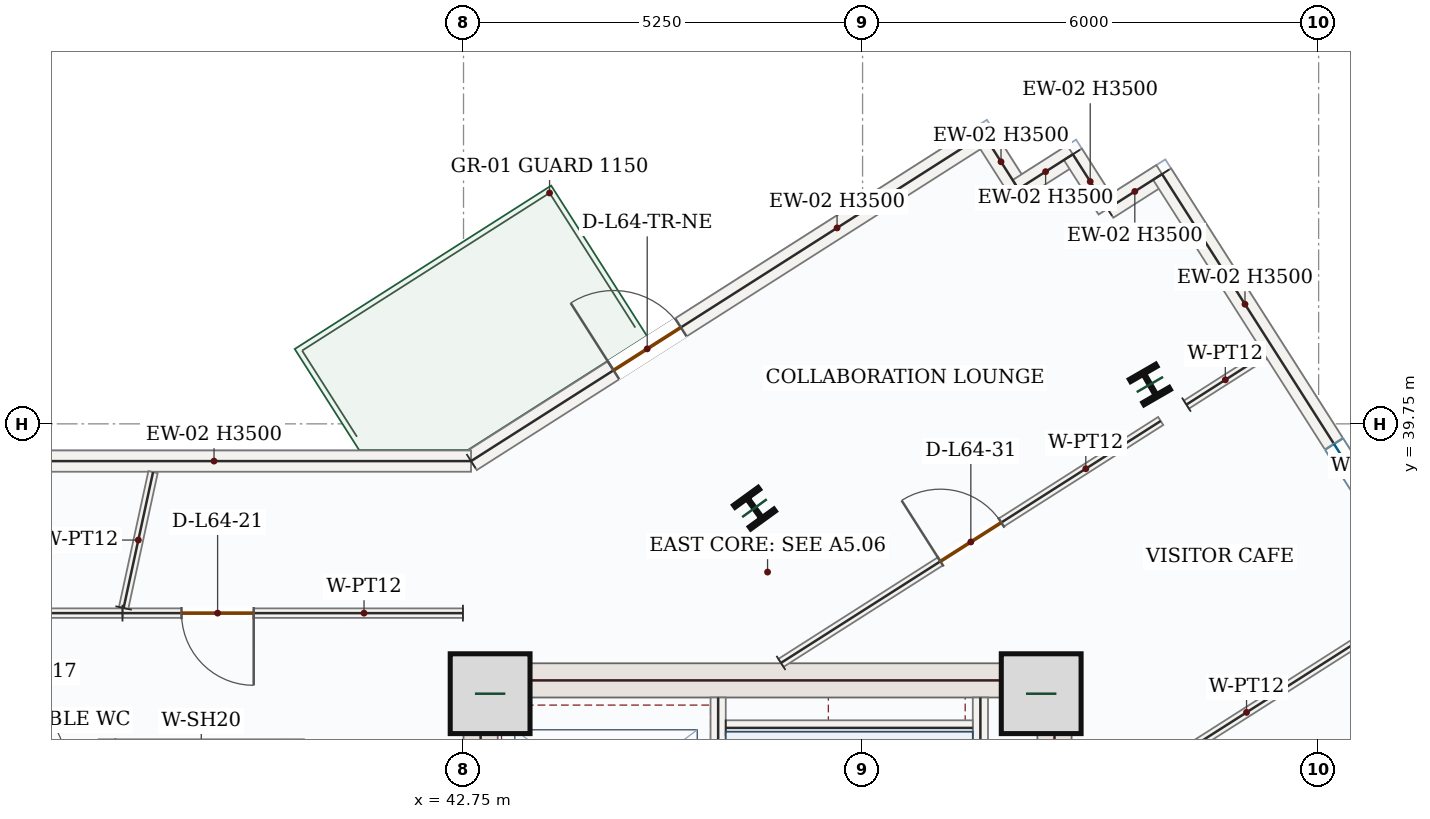
"""IFC4 building model, lengths in metres.
Left out: names, types, materials, properties, quantities, classifications, styles, units other than length and angle.
Written with IfcOpenShell. Run it as: python <this file> out.ifc"""

import sys

from ifc_helpers import new_model, si_unit, direction, frame, frame_2d, origin, origin_2d, place, context, subcontext, project, spatial, rectangle, i_section, extrude, source, transform, mapped, element, fill, save


model = new_model("IFC4")
c1 = context("Model", 3, precision=1e-05, world=origin(), true_north=direction((0.0, 1.0)))
c2 = subcontext(c1, "Body", "Model", "MODEL_VIEW")
j1 = project(units=[si_unit("LENGTHUNIT", "METRE"), si_unit("PLANEANGLEUNIT", "RADIAN")], contexts=[c1])
p1 = place(None, origin())
s1 = spatial("IfcSite", under=j1, at=p1, CompositionType="ELEMENT")
p2 = place(p1, origin())
s2 = spatial("IfcBuilding", under=s1, at=p2, CompositionType="ELEMENT")
p3 = place(p2, frame((0.0, 0.0, 269.1)))
s3 = spatial("IfcBuildingStorey", under=s2, at=p3, CompositionType="ELEMENT", Elevation=269.1)
p4 = place(p3, frame((42.975, 28.05, 0.0), z_axis=(0.0, 0.0, 1.0), x_axis=(0.0, 1.0, 0.0)))
e1 = element("IfcWall", 1, at=p4, inside=s3, PredefinedType="SHEAR", context=c2, shape_type="SweptSolid", body=[
    extrude(rectangle(XDim=8.55, YDim=0.45, at=frame_2d((4.275, 0.0))), origin(), (0.0, 0.0, 1.0), 3.5),
])
p5 = place(p4, frame((1.5, 0.0, 0.0)))
e2 = element("IfcOpeningElement", 2, at=p5, cuts=e1, PredefinedType="OPENING", context=c2, shape_type="SweptSolid", body=[
    extrude(rectangle(XDim=1.1, YDim=2.2, at=frame_2d((0.55, 1.1))), frame((0.0, 0.235, 0.0), z_axis=(0.0, -1.0, 0.0), x_axis=(1.0, 0.0, 0.0)), (0.0, 0.0, 1.0), 0.47),
])
m1 = source(origin(), c2, "Body", "SweptSolid", [
    extrude(rectangle(XDim=8.55, YDim=0.45, at=frame_2d((4.275, 0.0))), origin(), (0.0, 0.0, 1.0), 3.5),
])
p6 = place(p3, frame((50.525, 28.05, 0.0), z_axis=(0.0, 0.0, 1.0), x_axis=(0.0, 1.0, 0.0)))
e3 = element("IfcWall", 3, at=p6, inside=s3, PredefinedType="SHEAR", context=c2, shape_type="MappedRepresentation", body=[
    mapped(m1, transform((0.0, 0.0, 0.0), x_axis=(1.0, 0.0, 0.0), y_axis=(0.0, 1.0, 0.0), z_axis=(0.0, 0.0, 1.0), scale=1.0)),
])
m2 = source(origin(), c2, "Body", "SweptSolid", [
    extrude(rectangle(XDim=7.1, YDim=0.45, at=frame_2d((3.55, 0.0))), origin(), (0.0, 0.0, 1.0), 3.5),
])
p7 = place(p3, frame((43.2, 36.375, 0.0), z_axis=(0.0, 0.0, 1.0), x_axis=(1.0, 0.0, 0.0)))
e4 = element("IfcWall", 4, at=p7, inside=s3, PredefinedType="SHEAR", context=c2, shape_type="MappedRepresentation", body=[
    mapped(m2, transform((0.0, 0.0, 0.0), x_axis=(1.0, 0.0, 0.0), y_axis=(0.0, 1.0, 0.0), z_axis=(0.0, 0.0, 1.0), scale=1.0)),
])
m3 = source(origin(), c2, "Body", "SweptSolid", [
    extrude(rectangle(XDim=1.05, YDim=1.05, at=origin_2d()), origin(), (0.0, 0.0, 1.0), 3.75),
])
for number, where, z_axis, x_axis in (
    (5, (43.1, 36.2, 0.0), (0.0, 0.0, 1.0), (1.0, 0.0, 0.0)),
    (6, (50.35, 36.2, 0.0), (0.0, 0.0, 1.0), (1.0, 0.0, 0.0)),
):
    element("IfcColumn", number, at=place(p3, frame(where, z_axis=z_axis, x_axis=x_axis)), inside=s3, PredefinedType="COLUMN", context=c2, shape_type="MappedRepresentation", body=[
        mapped(m3, transform((0.0, 0.0, 0.0), x_axis=(1.0, 0.0, 0.0), y_axis=(0.0, 1.0, 0.0), z_axis=(0.0, 0.0, 1.0), scale=1.0)),
    ])
m4 = source(origin(), c2, "Body", "SweptSolid", [
    extrude(i_section(OverallWidth=0.399, OverallDepth=0.386, WebThickness=0.021, FlangeThickness=0.033, FilletRadius=0.018, at=origin_2d()), origin(), (0.0, 0.0, 1.0), 3.75),
])
for number, where, z_axis, x_axis in (
    (7, (46.578, 38.641, 0.0), (0.0, 0.0, 1.0), (0.809, 0.588, 0.0)),
    (8, (51.78, 40.268, 0.0), (0.0, 0.0, 1.0), (0.866, 0.5, 0.0)),
):
    element("IfcColumn", number, at=place(p3, frame(where, z_axis=z_axis, x_axis=x_axis)), inside=s3, PredefinedType="COLUMN", context=c2, shape_type="MappedRepresentation", body=[
        mapped(m4, transform((0.0, 0.0, 0.0), x_axis=(1.0, 0.0, 0.0), y_axis=(0.0, 1.0, 0.0), z_axis=(0.0, 0.0, 1.0), scale=1.0)),
    ])
p8 = place(p3, frame((42.849, 39.26, 0.0), z_axis=(0.0, 0.0, 1.0), x_axis=(0.843388565396, 0.537304129669, 0.0)))
e9 = element("IfcWall", 9, at=p8, inside=s3, PredefinedType="SOLIDWALL", context=c2, shape_type="SweptSolid", body=[
    extrude(rectangle(XDim=7.996, YDim=0.28, at=frame_2d((3.998, 0.0))), origin(), (0.0, 0.0, 1.0), 3.5),
])
p9 = place(p8, frame((2.223, 0.0, 0.0)))
e10 = element("IfcOpeningElement", 10, at=p9, cuts=e9, PredefinedType="OPENING", context=c2, shape_type="SweptSolid", body=[
    extrude(rectangle(XDim=1.05, YDim=2.15, at=frame_2d((0.525, 1.075))), frame((0.0, 0.15, 0.0), z_axis=(0.0, -1.0, 0.0), x_axis=(1.0, 0.0, 0.0)), (0.0, 0.0, 1.0), 0.3),
])
m5 = source(origin(), c2, "Body", "SweptSolid", [
    extrude(rectangle(XDim=0.85, YDim=0.28, at=frame_2d((0.425, 0.0))), origin(), (0.0, 0.0, 1.0), 3.5),
])
for number, where, z_axis, x_axis in (
    (11, (49.593, 43.556, 0.0), (0.0, 0.0, 1.0), (0.537, -0.843, 0.0)),
    (12, (50.05, 42.84, 0.0), (0.0, 0.0, 1.0), (0.843, 0.537, 0.0)),
    (13, (50.767, 43.296, 0.0), (0.0, 0.0, 1.0), (0.537, -0.843, 0.0)),
    (14, (51.223, 42.579, 0.0), (0.0, 0.0, 1.0), (0.843, 0.537, 0.0)),
):
    element("IfcWall", number, at=place(p3, frame(where, z_axis=z_axis, x_axis=x_axis)), inside=s3, PredefinedType="SOLIDWALL", context=c2, shape_type="MappedRepresentation", body=[
        mapped(m5, transform((0.0, 0.0, 0.0), x_axis=(1.0, 0.0, 0.0), y_axis=(0.0, 1.0, 0.0), z_axis=(0.0, 0.0, 1.0), scale=1.0)),
    ])
p10 = place(p3, frame((51.94, 43.036, 0.0), z_axis=(0.0, 0.0, 1.0), x_axis=(0.537314949054, -0.843381672508, 0.0)))
e15 = element("IfcWall", 15, at=p10, inside=s3, PredefinedType="SOLIDWALL", context=c2, shape_type="SweptSolid", body=[
    extrude(rectangle(XDim=9.92, YDim=0.28, at=frame_2d((4.96, 0.0))), origin(), (0.0, 0.0, 1.0), 3.5),
])
p11 = place(p10, frame((4.21, 0.0, 0.85)))
e16 = element("IfcOpeningElement", 16, at=p11, cuts=e15, PredefinedType="OPENING", context=c2, shape_type="SweptSolid", body=[
    extrude(rectangle(XDim=1.5, YDim=1.5, at=frame_2d((0.75, 0.75))), frame((0.0, 0.15, 0.0), z_axis=(0.0, -1.0, 0.0), x_axis=(1.0, 0.0, 0.0)), (0.0, 0.0, 1.0), 0.3),
])
m6 = source(origin(), c2, "Body", "SweptSolid", [
    extrude(rectangle(XDim=6.763, YDim=0.28, at=frame_2d((3.381, 0.0))), origin(), (0.0, 0.0, 1.0), 3.5),
])
p12 = place(p3, frame((36.086, 39.26, 0.0), z_axis=(0.0, 0.0, 1.0), x_axis=(1.0, 0.0, 0.0)))
e17 = element("IfcWall", 17, at=p12, inside=s3, PredefinedType="SOLIDWALL", context=c2, shape_type="MappedRepresentation", body=[
    mapped(m6, transform((0.0, 0.0, 0.0), x_axis=(1.0, 0.0, 0.0), y_axis=(0.0, 1.0, 0.0), z_axis=(0.0, 0.0, 1.0), scale=1.0)),
])
m7 = source(origin(), c2, "Body", "SweptSolid", [
    extrude(rectangle(XDim=7.87, YDim=0.2, at=frame_2d((3.935, 0.0))), origin(), (0.0, 0.0, 1.0), 3.5),
])
p13 = place(p3, frame((49.55, 28.28, 0.0), z_axis=(0.0, 0.0, 1.0), x_axis=(0.0, 1.0, 0.0)))
e18 = element("IfcWall", 18, at=p13, inside=s3, PredefinedType="SOLIDWALL", context=c2, shape_type="MappedRepresentation", body=[
    mapped(m7, transform((0.0, 0.0, 0.0), x_axis=(1.0, 0.0, 0.0), y_axis=(0.0, 1.0, 0.0), z_axis=(0.0, 0.0, 1.0), scale=1.0)),
])
p14 = place(p3, frame((46.1, 28.15, 0.0), z_axis=(0.0, 0.0, 1.0), x_axis=(0.0, 1.0, 0.0)))
e19 = element("IfcWall", 19, at=p14, inside=s3, PredefinedType="SOLIDWALL", context=c2, shape_type="SweptSolid", body=[
    extrude(rectangle(XDim=8.0, YDim=0.2, at=frame_2d((4.0, 0.0))), origin(), (0.0, 0.0, 1.0), 3.5),
])
p15 = place(p14, frame((0.4, 0.0, 0.0)))
e20 = element("IfcOpeningElement", 20, at=p15, cuts=e19, PredefinedType="OPENING", context=c2, shape_type="SweptSolid", body=[
    extrude(rectangle(XDim=1.05, YDim=2.15, at=frame_2d((0.525, 1.075))), frame((0.0, 0.11, 0.0), z_axis=(0.0, -1.0, 0.0), x_axis=(1.0, 0.0, 0.0)), (0.0, 0.0, 1.0), 0.22),
])
m8 = source(origin(), c2, "Body", "SweptSolid", [
    extrude(rectangle(XDim=3.25, YDim=0.2, at=frame_2d((1.625, 0.0))), origin(), (0.0, 0.0, 1.0), 3.5),
])
p16 = place(p3, frame((46.2, 35.75, 0.0), z_axis=(0.0, 0.0, 1.0), x_axis=(1.0, 0.0, 0.0)))
e21 = element("IfcWall", 21, at=p16, inside=s3, PredefinedType="SOLIDWALL", context=c2, shape_type="MappedRepresentation", body=[
    mapped(m8, transform((0.0, 0.0, 0.0), x_axis=(1.0, 0.0, 0.0), y_axis=(0.0, 1.0, 0.0), z_axis=(0.0, 0.0, 1.0), scale=1.0)),
])
m9 = source(origin(), c2, "Body", "SweptSolid", [
    extrude(rectangle(XDim=2.4, YDim=0.2, at=frame_2d((1.2, 0.0))), origin(), (0.0, 0.0, 1.0), 3.5),
])
p17 = place(p3, frame((38.05, 33.2, 0.0), z_axis=(0.0, 0.0, 1.0), x_axis=(0.0, 1.0, 0.0)))
e22 = element("IfcWall", 22, at=p17, inside=s3, PredefinedType="SOLIDWALL", context=c2, shape_type="MappedRepresentation", body=[
    mapped(m9, transform((0.0, 0.0, 0.0), x_axis=(1.0, 0.0, 0.0), y_axis=(0.0, 1.0, 0.0), z_axis=(0.0, 0.0, 1.0), scale=1.0)),
])
p18 = place(p3, frame((40.55, 33.2, 0.0), z_axis=(0.0, 0.0, 1.0), x_axis=(0.0, 1.0, 0.0)))
e23 = element("IfcWall", 23, at=p18, inside=s3, PredefinedType="SOLIDWALL", context=c2, shape_type="SweptSolid", body=[
    extrude(rectangle(XDim=2.4, YDim=0.2, at=frame_2d((1.2, 0.0))), origin(), (0.0, 0.0, 1.0), 3.5),
])
p19 = place(p18, frame((0.65, 0.0, 0.0)))
e24 = element("IfcOpeningElement", 24, at=p19, cuts=e23, PredefinedType="OPENING", context=c2, shape_type="SweptSolid", body=[
    extrude(rectangle(XDim=1.1, YDim=2.15, at=frame_2d((0.55, 1.075))), frame((0.0, 0.11, 0.0), z_axis=(0.0, -1.0, 0.0), x_axis=(1.0, 0.0, 0.0)), (0.0, 0.0, 1.0), 0.22),
])
p20 = place(p3, frame((46.927, 36.605, 0.0), z_axis=(0.0, 0.0, 1.0), x_axis=(0.843398332862, 0.537288797693, 0.0)))
e25 = element("IfcWall", 25, at=p20, inside=s3, PredefinedType="PARTITIONING", context=c2, shape_type="SweptSolid", body=[
    extrude(rectangle(XDim=5.924, YDim=0.125, at=frame_2d((2.962, 0.0))), origin(), (0.0, 0.0, 1.0), 3.5),
])
p21 = place(p20, frame((2.487, 0.0, 0.0)))
e26 = element("IfcOpeningElement", 26, at=p21, cuts=e25, PredefinedType="OPENING", context=c2, shape_type="SweptSolid", body=[
    extrude(rectangle(XDim=0.95, YDim=2.15, at=frame_2d((0.475, 1.075))), frame((0.0, 0.073, 0.0), z_axis=(0.0, -1.0, 0.0), x_axis=(1.0, 0.0, 0.0)), (0.0, 0.0, 1.0), 0.145),
])
m10 = source(origin(), c2, "Body", "SweptSolid", [
    extrude(rectangle(XDim=1.215, YDim=0.125, at=frame_2d((0.607, 0.0))), origin(), (0.0, 0.0, 1.0), 3.5),
])
p22 = place(p3, frame((52.26, 40.003, 0.0), z_axis=(0.0, 0.0, 1.0), x_axis=(0.84340481812, 0.537278617453, 0.0)))
e27 = element("IfcWall", 27, at=p22, inside=s3, PredefinedType="PARTITIONING", context=c2, shape_type="MappedRepresentation", body=[
    mapped(m10, transform((0.0, 0.0, 0.0), x_axis=(1.0, 0.0, 0.0), y_axis=(0.0, 1.0, 0.0), z_axis=(0.0, 0.0, 1.0), scale=1.0)),
])
m11 = source(origin(), c2, "Body", "SweptSolid", [
    extrude(rectangle(XDim=5.446, YDim=0.125, at=frame_2d((2.723, 0.0))), origin(), (0.0, 0.0, 1.0), 3.5),
])
p23 = place(p3, frame((55.348, 37.417, 0.0), z_axis=(0.0, 0.0, 1.0), x_axis=(-0.843395566027, -0.537293140851, 0.0)))
e28 = element("IfcWall", 28, at=p23, inside=s3, PredefinedType="PARTITIONING", context=c2, shape_type="MappedRepresentation", body=[
    mapped(m11, transform((0.0, 0.0, 0.0), x_axis=(1.0, 0.0, 0.0), y_axis=(0.0, 1.0, 0.0), z_axis=(0.0, 0.0, 1.0), scale=1.0)),
])
p24 = place(p3, frame((42.742, 37.26, 0.0), z_axis=(0.0, 0.0, 1.0), x_axis=(-0.999999998515, 5.4504824e-05, 0.0)))
e29 = element("IfcWall", 29, at=p24, inside=s3, PredefinedType="PARTITIONING", context=c2, shape_type="SweptSolid", body=[
    extrude(rectangle(XDim=4.479, YDim=0.125, at=frame_2d((2.24, 0.0))), origin(), (0.0, 0.0, 1.0), 3.5),
])
p25 = place(p24, frame((2.753, 0.0, 0.0)))
e30 = element("IfcOpeningElement", 30, at=p25, cuts=e29, PredefinedType="OPENING", context=c2, shape_type="SweptSolid", body=[
    extrude(rectangle(XDim=0.95, YDim=2.15, at=frame_2d((0.475, 1.075))), frame((0.0, 0.073, 0.0), z_axis=(0.0, -1.0, 0.0), x_axis=(1.0, 0.0, 0.0)), (0.0, 0.0, 1.0), 0.145),
])
m12 = source(origin(), c2, "Body", "SweptSolid", [
    extrude(rectangle(XDim=1.829, YDim=0.125, at=frame_2d((0.915, 0.0))), origin(), (0.0, 0.0, 1.0), 3.5),
])
p26 = place(p3, frame((38.278, 37.327, 0.0), z_axis=(0.0, 0.0, 1.0), x_axis=(0.21182559105, 0.977307484355, 0.0)))
e31 = element("IfcWall", 31, at=p26, inside=s3, PredefinedType="PARTITIONING", context=c2, shape_type="MappedRepresentation", body=[
    mapped(m12, transform((0.0, 0.0, 0.0), x_axis=(1.0, 0.0, 0.0), y_axis=(0.0, 1.0, 0.0), z_axis=(0.0, 0.0, 1.0), scale=1.0)),
])
p27 = place(p3, frame((38.263, 37.26, 0.0), z_axis=(0.0, 0.0, 1.0), x_axis=(-1.0, 0.0, 0.0)))
e32 = element("IfcWall", 32, at=p27, inside=s3, PredefinedType="PARTITIONING", context=c2, shape_type="SweptSolid", body=[
    extrude(rectangle(XDim=6.867, YDim=0.125, at=frame_2d((3.434, 0.0))), origin(), (0.0, 0.0, 1.0), 3.5),
])
p28 = place(p27, frame((2.071, 0.0, 0.0)))
e33 = element("IfcOpeningElement", 33, at=p28, cuts=e32, PredefinedType="OPENING", context=c2, shape_type="SweptSolid", body=[
    extrude(rectangle(XDim=0.95, YDim=2.15, at=frame_2d((0.475, 1.075))), frame((0.0, 0.073, 0.0), z_axis=(0.0, -1.0, 0.0), x_axis=(1.0, 0.0, 0.0)), (0.0, 0.0, 1.0), 0.145),
])
m13 = source(origin(), c2, "Body", "SweptSolid", [
    extrude(rectangle(XDim=1.05, YDim=2.15, at=frame_2d((0.525, 1.075))), frame((0.0, 0.025, 0.0), z_axis=(0.0, -1.0, 0.0), x_axis=(1.0, 0.0, 0.0)), (0.0, 0.0, 1.0), 0.05),
])
p29 = place(p9, origin())
e34 = element("IfcDoor", 34, at=p29, inside=s3, OperationType="SINGLE_SWING_LEFT", PredefinedType="DOOR", context=c2, shape_type="MappedRepresentation", body=[
    mapped(m13, transform((0.0, 0.0, 0.0), x_axis=(1.0, 0.0, 0.0), y_axis=(0.0, 1.0, 0.0), z_axis=(0.0, 0.0, 1.0), scale=1.0)),
])
fill(e10, e34)
m14 = source(origin(), c2, "Body", "SweptSolid", [
    extrude(rectangle(XDim=1.5, YDim=1.5, at=frame_2d((0.75, 0.75))), frame((0.0, 0.03, 0.0), z_axis=(0.0, -1.0, 0.0), x_axis=(1.0, 0.0, 0.0)), (0.0, 0.0, 1.0), 0.06),
])
p30 = place(p11, origin())
e35 = element("IfcWindow", 35, at=p30, inside=s3, PartitioningType="SINGLE_PANEL", PredefinedType="WINDOW", context=c2, shape_type="MappedRepresentation", body=[
    mapped(m14, transform((0.0, 0.0, 0.0), x_axis=(1.0, 0.0, 0.0), y_axis=(0.0, 1.0, 0.0), z_axis=(0.0, 0.0, 1.0), scale=1.0)),
])
fill(e16, e35)
m15 = source(origin(), c2, "Body", "SweptSolid", [
    extrude(rectangle(XDim=0.95, YDim=2.15, at=frame_2d((0.475, 1.075))), frame((0.0, 0.025, 0.0), z_axis=(0.0, -1.0, 0.0), x_axis=(1.0, 0.0, 0.0)), (0.0, 0.0, 1.0), 0.05),
])
p31 = place(p25, origin())
e36 = element("IfcDoor", 36, at=p31, inside=s3, OperationType="SINGLE_SWING_LEFT", PredefinedType="DOOR", context=c2, shape_type="MappedRepresentation", body=[
    mapped(m15, transform((0.0, 0.0, 0.0), x_axis=(1.0, 0.0, 0.0), y_axis=(0.0, 1.0, 0.0), z_axis=(0.0, 0.0, 1.0), scale=1.0)),
])
fill(e30, e36)
p32 = place(p21, origin())
e37 = element("IfcDoor", 37, at=p32, inside=s3, OperationType="SINGLE_SWING_LEFT", PredefinedType="DOOR", context=c2, shape_type="MappedRepresentation", body=[
    mapped(m15, transform((0.0, 0.0, 0.0), x_axis=(1.0, 0.0, 0.0), y_axis=(0.0, 1.0, 0.0), z_axis=(0.0, 0.0, 1.0), scale=1.0)),
])
fill(e26, e37)
save(model, sys.argv[1])
